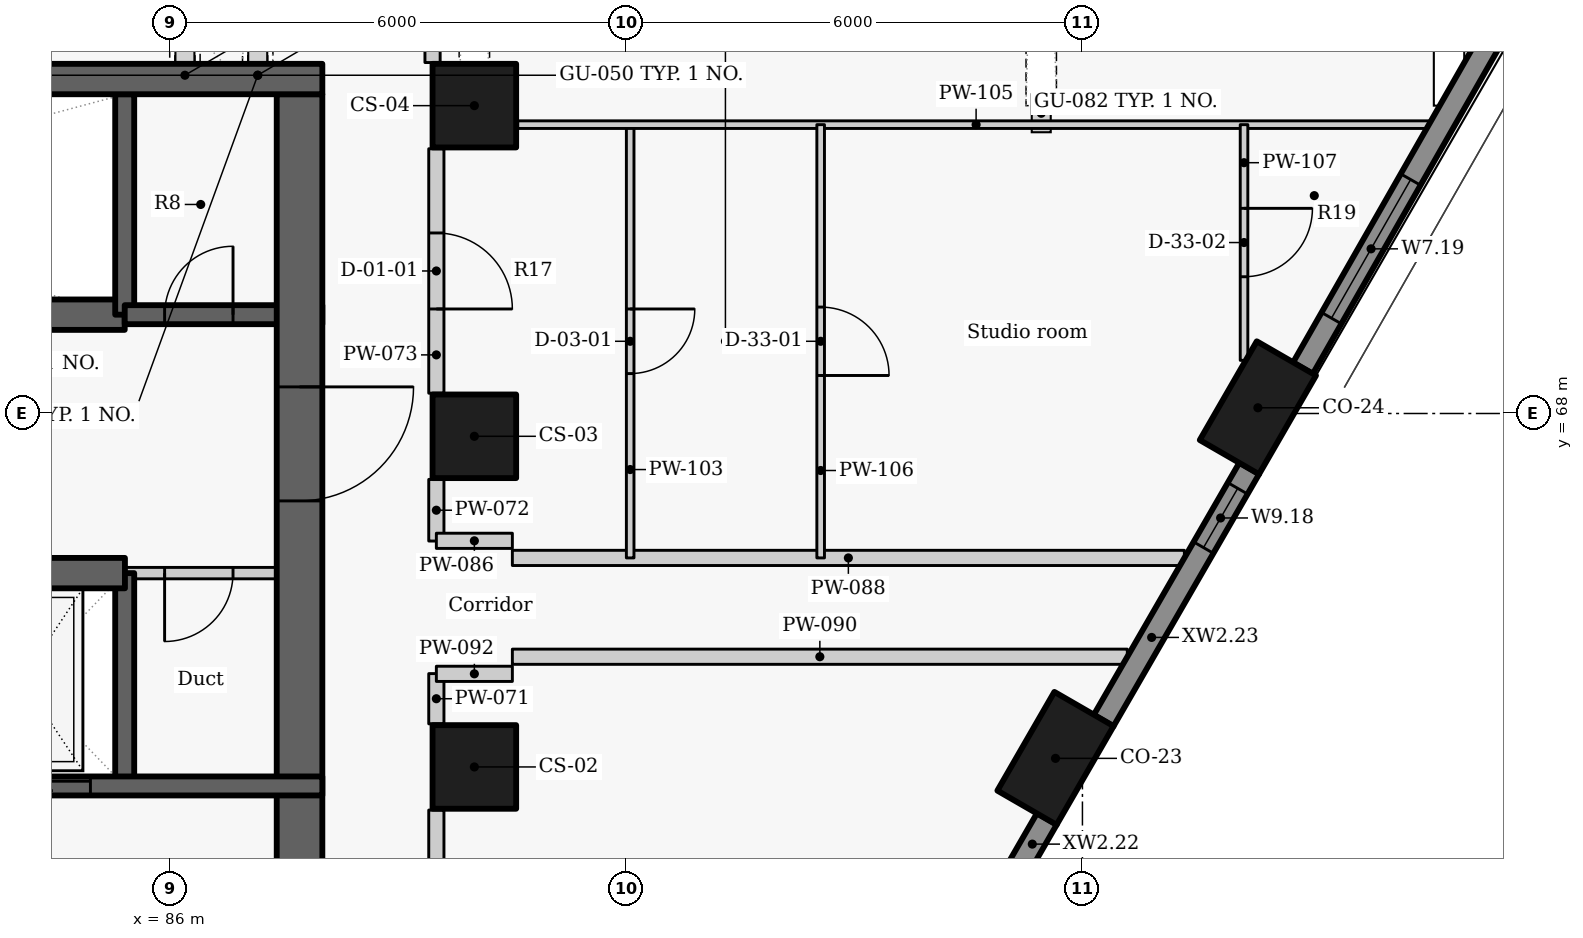
"""IFC4 building model, lengths in metres.
Left out: names, types, materials, properties, quantities, classifications, styles, units other than length and angle.
Written with IfcOpenShell. Run it as: python <this file> out.ifc"""

import sys

from ifc_helpers import new_model, si_unit, direction, frame, frame_2d, origin, origin_2d, place, context, subcontext, project, spatial, rectangle, extrude, element, fill, save


model = new_model("IFC4")
c1 = context("Model", 3, precision=1e-05, world=origin(), true_north=direction((0.0, 1.0)))
c2 = subcontext(c1, "Body", "Model", "MODEL_VIEW")
j1 = project(units=[si_unit("LENGTHUNIT", "METRE"), si_unit("PLANEANGLEUNIT", "RADIAN")], contexts=[c1])
p1 = place(None, origin())
s1 = spatial("IfcSite", under=j1, at=p1, CompositionType="ELEMENT")
p2 = place(p1, origin())
s2 = spatial("IfcBuilding", under=s1, at=p2, CompositionType="ELEMENT")
p3 = place(p2, frame((0.0, 0.0, 38.1)))
s3 = spatial("IfcBuildingStorey", under=s2, at=p3, CompositionType="ELEMENT", Elevation=38.1)
for number, where, z_axis, x_axis in (
    (1, (97.646, 63.463, 0.0), (0.0, 0.0, 1.0), (0.5, 0.866, 0.0)),
    (2, (100.308, 68.075, 0.0), (0.0, 0.0, 1.0), (0.5, 0.866, 0.0)),
):
    element("IfcColumn", number, at=place(p3, frame(where, z_axis=z_axis, x_axis=x_axis)), inside=s3, PredefinedType="COLUMN", context=c2, shape_type="SweptSolid", body=[
        extrude(rectangle(XDim=1.5, YDim=0.9, at=origin_2d()), origin(), (0.0, 0.0, 1.0), 3.3),
    ])
for number, where, z_axis, x_axis in (
    (3, (90.0, 63.35, 0.0), (0.0, 0.0, 1.0), (0.0, 1.0, 0.0)),
    (4, (90.0, 67.7, 0.0), (0.0, 0.0, 1.0), (0.0, 1.0, 0.0)),
    (5, (90.0, 72.05, 0.0), (0.0, 0.0, 1.0), (0.0, 1.0, 0.0)),
):
    element("IfcColumn", number, at=place(p3, frame(where, z_axis=z_axis, x_axis=x_axis)), inside=s3, PredefinedType="COLUMN", context=c2, shape_type="SweptSolid", body=[
        extrude(rectangle(XDim=1.1, YDim=1.1, at=origin_2d()), origin(), (0.0, 0.0, 1.0), 3.3),
    ])
p4 = place(p3, frame((95.615, 59.346, 0.0), z_axis=(0.0, 0.0, 1.0), x_axis=(0.499974163209, 0.866040320149, 0.0)))
e6 = element("IfcWall", 6, at=p4, inside=s3, PredefinedType="SOLIDWALL", context=c2, shape_type="SweptSolid", body=[
    extrude(rectangle(XDim=3.834, YDim=0.3, at=frame_2d((1.917, 0.0))), origin(), (0.0, 0.0, 1.0), 2.425),
])
p5 = place(p4, frame((0.867, 0.0, 0.9)))
e7 = element("IfcOpeningElement", 7, at=p5, cuts=e6, PredefinedType="OPENING", context=c2, shape_type="SweptSolid", body=[
    extrude(rectangle(XDim=2.1, YDim=1.1, at=frame_2d((1.05, 0.55))), frame((0.0, 0.16, 0.0), z_axis=(0.0, -1.0, 0.0), x_axis=(1.0, 0.0, 0.0)), (0.0, 0.0, 1.0), 0.32),
])
p6 = place(p3, frame((98.278, 63.959, 0.0), z_axis=(0.0, 0.0, 1.0), x_axis=(0.500001735503, 0.866024401789, 0.0)))
e8 = element("IfcWall", 8, at=p6, inside=s3, PredefinedType="SOLIDWALL", context=c2, shape_type="SweptSolid", body=[
    extrude(rectangle(XDim=3.834, YDim=0.3, at=frame_2d((1.917, 0.0))), origin(), (0.0, 0.0, 1.0), 2.425),
])
p7 = place(p6, frame((2.629, 0.0, 0.9)))
e9 = element("IfcOpeningElement", 9, at=p7, cuts=e8, PredefinedType="OPENING", context=c2, shape_type="SweptSolid", body=[
    extrude(rectangle(XDim=0.9, YDim=1.1, at=frame_2d((0.45, 0.55))), frame((0.0, 0.16, 0.0), z_axis=(0.0, -1.0, 0.0), x_axis=(1.0, 0.0, 0.0)), (0.0, 0.0, 1.0), 0.32),
])
p8 = place(p3, frame((100.9, 68.595, 0.0), z_axis=(0.0, 0.0, 1.0), x_axis=(0.49599088679, 0.868327726277, 0.0)))
e10 = element("IfcWall", 10, at=p8, inside=s3, PredefinedType="SOLIDWALL", context=c2, shape_type="SweptSolid", body=[
    extrude(rectangle(XDim=10.656, YDim=0.3, at=frame_2d((5.328, 0.0))), origin(), (0.0, 0.0, 1.0), 2.425),
])
p9 = place(p8, frame((0.759, 0.0, 0.9)))
e11 = element("IfcOpeningElement", 11, at=p9, cuts=e10, PredefinedType="OPENING", context=c2, shape_type="SweptSolid", body=[
    extrude(rectangle(XDim=2.1, YDim=1.1, at=frame_2d((1.05, 0.55))), frame((0.0, 0.16, 0.0), z_axis=(0.0, -1.0, 0.0), x_axis=(1.0, 0.0, 0.0)), (0.0, 0.0, 1.0), 0.32),
])
p10 = place(p3, frame((74.6, 69.3, -0.4), z_axis=(0.0, 0.0, 1.0), x_axis=(1.0, 0.0, 0.0)))
e12 = element("IfcWall", 12, at=p10, inside=s3, PredefinedType="SHEAR", context=c2, shape_type="SweptSolid", body=[
    extrude(rectangle(XDim=10.8, YDim=0.4, at=frame_2d((5.4, 0.0))), origin(), (0.0, 0.0, 1.0), 3.425),
])
p11 = place(p10, frame((0.8, 0.0, 0.4)))
e13 = element("IfcOpeningElement", 13, at=p11, cuts=e12, PredefinedType="OPENING", context=c2, shape_type="SweptSolid", body=[
    extrude(rectangle(XDim=1.1, YDim=2.1, at=frame_2d((0.55, 1.05))), frame((0.0, 0.21, 0.0), z_axis=(0.0, -1.0, 0.0), x_axis=(1.0, 0.0, 0.0)), (0.0, 0.0, 1.0), 0.42),
])
p12 = place(p10, frame((3.5, 0.0, 0.4)))
e14 = element("IfcOpeningElement", 14, at=p12, cuts=e12, PredefinedType="OPENING", context=c2, shape_type="SweptSolid", body=[
    extrude(rectangle(XDim=1.1, YDim=2.1, at=frame_2d((0.55, 1.05))), frame((0.0, 0.21, 0.0), z_axis=(0.0, -1.0, 0.0), x_axis=(1.0, 0.0, 0.0)), (0.0, 0.0, 1.0), 0.42),
])
p13 = place(p10, frame((6.2, 0.0, 0.4)))
e15 = element("IfcOpeningElement", 15, at=p13, cuts=e12, PredefinedType="OPENING", context=c2, shape_type="SweptSolid", body=[
    extrude(rectangle(XDim=1.1, YDim=2.1, at=frame_2d((0.55, 1.05))), frame((0.0, 0.21, 0.0), z_axis=(0.0, -1.0, 0.0), x_axis=(1.0, 0.0, 0.0)), (0.0, 0.0, 1.0), 0.42),
])
p14 = place(p3, frame((85.4, 63.1, -0.4), z_axis=(0.0, 0.0, 1.0), x_axis=(0.0, 1.0, 0.0)))
e16 = element("IfcWall", 16, at=p14, inside=s3, PredefinedType="SHEAR", context=c2, shape_type="SweptSolid", body=[
    extrude(rectangle(XDim=2.8, YDim=0.25, at=frame_2d((1.4, 0.0))), origin(), (0.0, 0.0, 1.0), 3.425),
])
p15 = place(p3, frame((85.4, 69.3, -0.4), z_axis=(0.0, 0.0, 1.0), x_axis=(0.0, 1.0, 0.0)))
e17 = element("IfcWall", 17, at=p15, inside=s3, PredefinedType="SHEAR", context=c2, shape_type="SweptSolid", body=[
    extrude(rectangle(XDim=2.9, YDim=0.25, at=frame_2d((1.45, 0.0))), origin(), (0.0, 0.0, 1.0), 3.425),
])
p16 = place(p3, frame((85.4, 69.3, -0.4), z_axis=(0.0, 0.0, 1.0), x_axis=(1.0, 0.0, 0.0)))
e18 = element("IfcWall", 18, at=p16, inside=s3, PredefinedType="SHEAR", context=c2, shape_type="SweptSolid", body=[
    extrude(rectangle(XDim=2.6, YDim=0.25, at=frame_2d((1.3, 0.0))), origin(), (0.0, 0.0, 1.0), 3.425),
])
p17 = place(p16, frame((0.525, 0.0, 0.4)))
e19 = element("IfcOpeningElement", 19, at=p17, cuts=e18, PredefinedType="OPENING", context=c2, shape_type="SweptSolid", body=[
    extrude(rectangle(XDim=0.9, YDim=2.1, at=frame_2d((0.45, 1.05))), frame((0.0, 0.135, 0.0), z_axis=(0.0, -1.0, 0.0), x_axis=(1.0, 0.0, 0.0)), (0.0, 0.0, 1.0), 0.27),
])
p18 = place(p3, frame((87.7, 72.2, -0.4), z_axis=(0.0, 0.0, 1.0), x_axis=(0.0, -1.0, 0.0)))
e20 = element("IfcWall", 20, at=p18, inside=s3, PredefinedType="SHEAR", context=c2, shape_type="SweptSolid", body=[
    extrude(rectangle(XDim=15.6, YDim=0.6, at=frame_2d((7.8, 0.0))), origin(), (0.0, 0.0, 1.0), 3.425),
])
p19 = place(p18, frame((3.85, 0.0, 0.4)))
e21 = element("IfcOpeningElement", 21, at=p19, cuts=e20, PredefinedType="OPENING", context=c2, shape_type="SweptSolid", body=[
    extrude(rectangle(XDim=1.5, YDim=2.1, at=frame_2d((0.75, 1.05))), frame((0.0, 0.31, 0.0), z_axis=(0.0, -1.0, 0.0), x_axis=(1.0, 0.0, 0.0)), (0.0, 0.0, 1.0), 0.62),
])
p20 = place(p18, frame((11.8, 0.0, 0.4)))
e22 = element("IfcOpeningElement", 22, at=p20, cuts=e20, PredefinedType="OPENING", context=c2, shape_type="SweptSolid", body=[
    extrude(rectangle(XDim=1.1, YDim=2.1, at=frame_2d((0.55, 1.05))), frame((0.0, 0.31, 0.0), z_axis=(0.0, -1.0, 0.0), x_axis=(1.0, 0.0, 0.0)), (0.0, 0.0, 1.0), 0.62),
])
p21 = place(p3, frame((88.0, 65.9, 0.0), z_axis=(0.0, 0.0, 1.0), x_axis=(-1.0, 0.0, 0.0)))
e23 = element("IfcWall", 23, at=p21, inside=s3, PredefinedType="PARTITIONING", context=c2, shape_type="SweptSolid", body=[
    extrude(rectangle(XDim=2.603, YDim=0.15, at=frame_2d((1.302, 0.0))), origin(), (0.0, 0.0, 1.0), 3.025),
])
p22 = place(p21, frame((1.175, 0.0, 0.0)))
e24 = element("IfcOpeningElement", 24, at=p22, cuts=e23, PredefinedType="OPENING", context=c2, shape_type="SweptSolid", body=[
    extrude(rectangle(XDim=0.9, YDim=2.1, at=frame_2d((0.45, 1.05))), frame((0.0, 0.085, 0.0), z_axis=(0.0, -1.0, 0.0), x_axis=(1.0, 0.0, 0.0)), (0.0, 0.0, 1.0), 0.17),
])
p23 = place(p3, frame((82.697, 65.9, -0.4), z_axis=(0.0, 0.0, 1.0), x_axis=(1.0, 0.0, 0.0)))
e25 = element("IfcWall", 25, at=p23, inside=s3, PredefinedType="SHEAR", context=c2, shape_type="SweptSolid", body=[
    extrude(rectangle(XDim=2.706, YDim=0.4, at=frame_2d((1.353, 0.0))), origin(), (0.0, 0.0, 1.0), 3.425),
])
p24 = place(p3, frame((80.0, 63.1, -0.4), z_axis=(0.0, 0.0, 1.0), x_axis=(1.0, 0.0, 0.0)))
e26 = element("IfcWall", 26, at=p24, inside=s3, PredefinedType="SHEAR", context=c2, shape_type="SweptSolid", body=[
    extrude(rectangle(XDim=8.0, YDim=0.25, at=frame_2d((4.0, 0.0))), origin(), (0.0, 0.0, 1.0), 3.425),
])
p25 = place(p24, frame((3.849, 0.0, 0.4)))
e27 = element("IfcOpeningElement", 27, at=p25, cuts=e26, PredefinedType="OPENING", context=c2, shape_type="SweptSolid", body=[
    extrude(rectangle(XDim=1.1, YDim=2.1, at=frame_2d((0.55, 1.05))), frame((0.0, 0.135, 0.0), z_axis=(0.0, -1.0, 0.0), x_axis=(1.0, 0.0, 0.0)), (0.0, 0.0, 1.0), 0.27),
])
p26 = place(p3, frame((89.5, 62.783, 0.0), z_axis=(0.0, 0.0, 1.0), x_axis=(0.0, -1.0, 0.0)))
e28 = element("IfcWall", 28, at=p26, inside=s3, PredefinedType="PARTITIONING", context=c2, shape_type="SweptSolid", body=[
    extrude(rectangle(XDim=3.216, YDim=0.2, at=frame_2d((1.608, 0.0))), origin(), (0.0, 0.0, 1.0), 3.025),
])
p27 = place(p26, frame((1.108, 0.0, 0.0)))
e29 = element("IfcOpeningElement", 29, at=p27, cuts=e28, PredefinedType="OPENING", context=c2, shape_type="SweptSolid", body=[
    extrude(rectangle(XDim=1.0, YDim=2.1, at=frame_2d((0.5, 1.05))), frame((0.0, 0.11, 0.0), z_axis=(0.0, -1.0, 0.0), x_axis=(1.0, 0.0, 0.0)), (0.0, 0.0, 1.0), 0.22),
])
p28 = place(p3, frame((89.5, 63.917, 0.0), z_axis=(0.0, 0.0, 1.0), x_axis=(0.0, 1.0, 0.0)))
e30 = element("IfcWall", 30, at=p28, inside=s3, PredefinedType="PARTITIONING", context=c2, shape_type="SweptSolid", body=[
    extrude(rectangle(XDim=0.661, YDim=0.2, at=frame_2d((0.331, 0.0))), origin(), (0.0, 0.0, 1.0), 3.025),
])
p29 = place(p3, frame((89.5, 66.322, 0.0), z_axis=(0.0, 0.0, 1.0), x_axis=(0.0, 1.0, 0.0)))
e31 = element("IfcWall", 31, at=p29, inside=s3, PredefinedType="PARTITIONING", context=c2, shape_type="SweptSolid", body=[
    extrude(rectangle(XDim=0.811, YDim=0.2, at=frame_2d((0.406, 0.0))), origin(), (0.0, 0.0, 1.0), 3.025),
])
p30 = place(p3, frame((89.5, 71.483, 0.0), z_axis=(0.0, 0.0, 1.0), x_axis=(0.0, -1.0, 0.0)))
e32 = element("IfcWall", 32, at=p30, inside=s3, PredefinedType="PARTITIONING", context=c2, shape_type="SweptSolid", body=[
    extrude(rectangle(XDim=3.216, YDim=0.2, at=frame_2d((1.608, 0.0))), origin(), (0.0, 0.0, 1.0), 3.025),
])
p31 = place(p30, frame((1.108, 0.0, 0.0)))
e33 = element("IfcOpeningElement", 33, at=p31, cuts=e32, PredefinedType="OPENING", context=c2, shape_type="SweptSolid", body=[
    extrude(rectangle(XDim=1.0, YDim=2.1, at=frame_2d((0.5, 1.05))), frame((0.0, 0.11, 0.0), z_axis=(0.0, -1.0, 0.0), x_axis=(1.0, 0.0, 0.0)), (0.0, 0.0, 1.0), 0.22),
])
p32 = place(p3, frame((89.45, 87.383, 0.0), z_axis=(0.0, 0.0, 1.0), x_axis=(0.0, -1.0, 0.0)))
e34 = element("IfcWall", 34, at=p32, inside=s3, PredefinedType="PARTITIONING", context=c2, shape_type="SweptSolid", body=[
    extrude(rectangle(XDim=14.766, YDim=0.2, at=frame_2d((7.383, 0.0))), origin(), (0.0, 0.0, 1.0), 3.025),
])
p33 = place(p32, frame((9.575, 0.0, 0.0)))
e35 = element("IfcOpeningElement", 35, at=p33, cuts=e34, PredefinedType="OPENING", context=c2, shape_type="SweptSolid", body=[
    extrude(rectangle(XDim=1.0, YDim=2.1, at=frame_2d((0.5, 1.05))), frame((0.0, 0.11, 0.0), z_axis=(0.0, -1.0, 0.0), x_axis=(1.0, 0.0, 0.0)), (0.0, 0.0, 1.0), 0.22),
])
p34 = place(p32, frame((4.258, 0.0, 0.0)))
e36 = element("IfcOpeningElement", 36, at=p34, cuts=e34, PredefinedType="OPENING", context=c2, shape_type="SweptSolid", body=[
    extrude(rectangle(XDim=1.0, YDim=2.1, at=frame_2d((0.5, 1.05))), frame((0.0, 0.11, 0.0), z_axis=(0.0, -1.0, 0.0), x_axis=(1.0, 0.0, 0.0)), (0.0, 0.0, 1.0), 0.22),
])
p35 = place(p3, frame((89.5, 66.325, 0.0), z_axis=(0.0, 0.0, 1.0), x_axis=(1.0, 0.0, 0.0)))
e37 = element("IfcWall", 37, at=p35, inside=s3, PredefinedType="PARTITIONING", context=c2, shape_type="SweptSolid", body=[
    extrude(rectangle(XDim=1.0, YDim=0.2, at=frame_2d((0.5, 0.0))), origin(), (0.0, 0.0, 1.0), 2.505),
])
p36 = place(p3, frame((90.5, 66.1, 0.0), z_axis=(0.0, 0.0, 1.0), x_axis=(1.0, 0.0, 0.0)))
e38 = element("IfcWall", 38, at=p36, inside=s3, PredefinedType="PARTITIONING", context=c2, shape_type="SweptSolid", body=[
    extrude(rectangle(XDim=8.841, YDim=0.2, at=frame_2d((4.421, 0.0))), origin(), (0.0, 0.0, 1.0), 2.405),
])
p37 = place(p3, frame((90.5, 64.8, 0.0), z_axis=(0.0, 0.0, 1.0), x_axis=(1.0, 0.0, 0.0)))
e39 = element("IfcWall", 39, at=p37, inside=s3, PredefinedType="PARTITIONING", context=c2, shape_type="SweptSolid", body=[
    extrude(rectangle(XDim=8.091, YDim=0.2, at=frame_2d((4.045, 0.0))), origin(), (0.0, 0.0, 1.0), 2.405),
])
p38 = place(p3, frame((89.5, 64.575, 0.0), z_axis=(0.0, 0.0, 1.0), x_axis=(1.0, 0.0, 0.0)))
e40 = element("IfcWall", 40, at=p38, inside=s3, PredefinedType="PARTITIONING", context=c2, shape_type="SweptSolid", body=[
    extrude(rectangle(XDim=1.0, YDim=0.2, at=frame_2d((0.5, 0.0))), origin(), (0.0, 0.0, 1.0), 2.505),
])
p39 = place(p3, frame((92.05, 71.8, 0.0), z_axis=(0.0, 0.0, 1.0), x_axis=(0.0, -1.0, 0.0)))
e41 = element("IfcWall", 41, at=p39, inside=s3, PredefinedType="PARTITIONING", context=c2, shape_type="SweptSolid", body=[
    extrude(rectangle(XDim=5.7, YDim=0.1, at=frame_2d((2.85, 0.0))), origin(), (0.0, 0.0, 1.0), 3.025),
])
p40 = place(p39, frame((2.425, 0.0, 0.0)))
e42 = element("IfcOpeningElement", 42, at=p40, cuts=e41, PredefinedType="OPENING", context=c2, shape_type="SweptSolid", body=[
    extrude(rectangle(XDim=0.85, YDim=2.1, at=frame_2d((0.425, 1.05))), frame((0.0, 0.06, 0.0), z_axis=(0.0, -1.0, 0.0), x_axis=(1.0, 0.0, 0.0)), (0.0, 0.0, 1.0), 0.12),
])
p41 = place(p3, frame((90.57, 71.8, 0.0), z_axis=(0.0, 0.0, 1.0), x_axis=(1.0, 0.0, 0.0)))
e43 = element("IfcWall", 43, at=p41, inside=s3, PredefinedType="PARTITIONING", context=c2, shape_type="SweptSolid", body=[
    extrude(rectangle(XDim=12.062, YDim=0.1, at=frame_2d((6.031, 0.0))), origin(), (0.0, 0.0, 1.0), 2.405),
])
p42 = place(p3, frame((94.556, 71.8, 0.0), z_axis=(0.0, 0.0, 1.0), x_axis=(0.0, -1.0, 0.0)))
e44 = element("IfcWall", 44, at=p42, inside=s3, PredefinedType="PARTITIONING", context=c2, shape_type="SweptSolid", body=[
    extrude(rectangle(XDim=5.7, YDim=0.1, at=frame_2d((2.85, 0.0))), origin(), (0.0, 0.0, 1.0), 3.025),
])
p43 = place(p42, frame((2.4, 0.0, 0.0)))
e45 = element("IfcOpeningElement", 45, at=p43, cuts=e44, PredefinedType="OPENING", context=c2, shape_type="SweptSolid", body=[
    extrude(rectangle(XDim=0.9, YDim=2.1, at=frame_2d((0.45, 1.05))), frame((0.0, 0.06, 0.0), z_axis=(0.0, -1.0, 0.0), x_axis=(1.0, 0.0, 0.0)), (0.0, 0.0, 1.0), 0.12),
])
p44 = place(p3, frame((100.126, 71.8, 0.0), z_axis=(0.0, 0.0, 1.0), x_axis=(0.0, -1.0, 0.0)))
e46 = element("IfcWall", 46, at=p44, inside=s3, PredefinedType="PARTITIONING", context=c2, shape_type="SweptSolid", body=[
    extrude(rectangle(XDim=3.101, YDim=0.1, at=frame_2d((1.551, 0.0))), origin(), (0.0, 0.0, 1.0), 3.025),
])
p45 = place(p44, frame((1.101, 0.0, 0.0)))
e47 = element("IfcOpeningElement", 47, at=p45, cuts=e46, PredefinedType="OPENING", context=c2, shape_type="SweptSolid", body=[
    extrude(rectangle(XDim=0.9, YDim=2.1, at=frame_2d((0.45, 1.05))), frame((0.0, 0.06, 0.0), z_axis=(0.0, -1.0, 0.0), x_axis=(1.0, 0.0, 0.0)), (0.0, 0.0, 1.0), 0.12),
])
p46 = place(p3, frame((72.0, 72.4, -0.4), z_axis=(0.0, 0.0, 1.0), x_axis=(1.0, 0.0, 0.0)))
e48 = element("IfcWall", 48, at=p46, inside=s3, PredefinedType="SHEAR", context=c2, shape_type="SweptSolid", body=[
    extrude(rectangle(XDim=16.0, YDim=0.4, at=frame_2d((8.0, 0.0))), origin(), (0.0, 0.0, 1.0), 3.425),
])
p47 = place(p7, origin())
e49 = element("IfcWindow", 49, at=p47, inside=s3, PartitioningType="SINGLE_PANEL", PredefinedType="WINDOW", context=c2, shape_type="SweptSolid", body=[
    extrude(rectangle(XDim=0.9, YDim=1.1, at=frame_2d((0.45, 0.55))), frame((0.0, 0.03, 0.0), z_axis=(0.0, -1.0, 0.0), x_axis=(1.0, 0.0, 0.0)), (0.0, 0.0, 1.0), 0.06),
])
fill(e9, e49)
p48 = place(p9, origin())
e50 = element("IfcWindow", 50, at=p48, inside=s3, PartitioningType="SINGLE_PANEL", PredefinedType="WINDOW", context=c2, shape_type="SweptSolid", body=[
    extrude(rectangle(XDim=2.1, YDim=1.1, at=frame_2d((1.05, 0.55))), frame((0.0, 0.03, 0.0), z_axis=(0.0, -1.0, 0.0), x_axis=(1.0, 0.0, 0.0)), (0.0, 0.0, 1.0), 0.06),
])
fill(e11, e50)
p49 = place(p17, origin())
e51 = element("IfcDoor", 51, at=p49, inside=s3, OperationType="SINGLE_SWING_RIGHT", PredefinedType="DOOR", context=c2, shape_type="SweptSolid", body=[
    extrude(rectangle(XDim=0.9, YDim=2.1, at=frame_2d((0.45, 1.05))), frame((0.0, 0.025, 0.0), z_axis=(0.0, -1.0, 0.0), x_axis=(1.0, 0.0, 0.0)), (0.0, 0.0, 1.0), 0.05),
])
fill(e19, e51)
p50 = place(p25, origin())
e52 = element("IfcDoor", 52, at=p50, inside=s3, OperationType="SLIDING_TO_LEFT", PredefinedType="DOOR", context=c2, shape_type="SweptSolid", body=[
    extrude(rectangle(XDim=1.1, YDim=2.1, at=frame_2d((0.55, 1.05))), frame((0.0, 0.025, 0.0), z_axis=(0.0, -1.0, 0.0), x_axis=(1.0, 0.0, 0.0)), (0.0, 0.0, 1.0), 0.05),
])
fill(e27, e52)
p51 = place(p22, origin())
e53 = element("IfcDoor", 53, at=p51, inside=s3, OperationType="SINGLE_SWING_RIGHT", PredefinedType="DOOR", context=c2, shape_type="SweptSolid", body=[
    extrude(rectangle(XDim=0.9, YDim=2.1, at=frame_2d((0.45, 1.05))), frame((0.0, 0.025, 0.0), z_axis=(0.0, -1.0, 0.0), x_axis=(1.0, 0.0, 0.0)), (0.0, 0.0, 1.0), 0.05),
])
fill(e24, e53)
p52 = place(p31, origin())
e54 = element("IfcDoor", 54, at=p52, inside=s3, OperationType="SINGLE_SWING_RIGHT", PredefinedType="DOOR", context=c2, shape_type="SweptSolid", body=[
    extrude(rectangle(XDim=1.0, YDim=2.1, at=frame_2d((0.5, 1.05))), frame((0.0, 0.025, 0.0), z_axis=(0.0, -1.0, 0.0), x_axis=(1.0, 0.0, 0.0)), (0.0, 0.0, 1.0), 0.05),
])
fill(e33, e54)
p53 = place(p40, origin())
e55 = element("IfcDoor", 55, at=p53, inside=s3, OperationType="SINGLE_SWING_LEFT", PredefinedType="DOOR", context=c2, shape_type="SweptSolid", body=[
    extrude(rectangle(XDim=0.85, YDim=2.1, at=frame_2d((0.425, 1.05))), frame((0.0, 0.025, 0.0), z_axis=(0.0, -1.0, 0.0), x_axis=(1.0, 0.0, 0.0)), (0.0, 0.0, 1.0), 0.05),
])
fill(e42, e55)
p54 = place(p43, origin())
e56 = element("IfcDoor", 56, at=p54, inside=s3, OperationType="SINGLE_SWING_RIGHT", PredefinedType="DOOR", context=c2, shape_type="SweptSolid", body=[
    extrude(rectangle(XDim=0.9, YDim=2.1, at=frame_2d((0.45, 1.05))), frame((0.0, 0.025, 0.0), z_axis=(0.0, -1.0, 0.0), x_axis=(1.0, 0.0, 0.0)), (0.0, 0.0, 1.0), 0.05),
])
fill(e45, e56)
p55 = place(p45, origin())
e57 = element("IfcDoor", 57, at=p55, inside=s3, OperationType="SINGLE_SWING_LEFT", PredefinedType="DOOR", context=c2, shape_type="SweptSolid", body=[
    extrude(rectangle(XDim=0.9, YDim=2.1, at=frame_2d((0.45, 1.05))), frame((0.0, 0.025, 0.0), z_axis=(0.0, -1.0, 0.0), x_axis=(1.0, 0.0, 0.0)), (0.0, 0.0, 1.0), 0.05),
])
fill(e47, e57)
p56 = place(p19, origin())
e58 = element("IfcDoor", 58, at=p56, inside=s3, OperationType="DOUBLE_DOOR_SINGLE_SWING", PredefinedType="DOOR", context=c2, shape_type="SweptSolid", body=[
    extrude(rectangle(XDim=1.5, YDim=2.1, at=frame_2d((0.75, 1.05))), frame((0.0, 0.025, 0.0), z_axis=(0.0, -1.0, 0.0), x_axis=(1.0, 0.0, 0.0)), (0.0, 0.0, 1.0), 0.05),
])
fill(e21, e58)
save(model, sys.argv[1])
